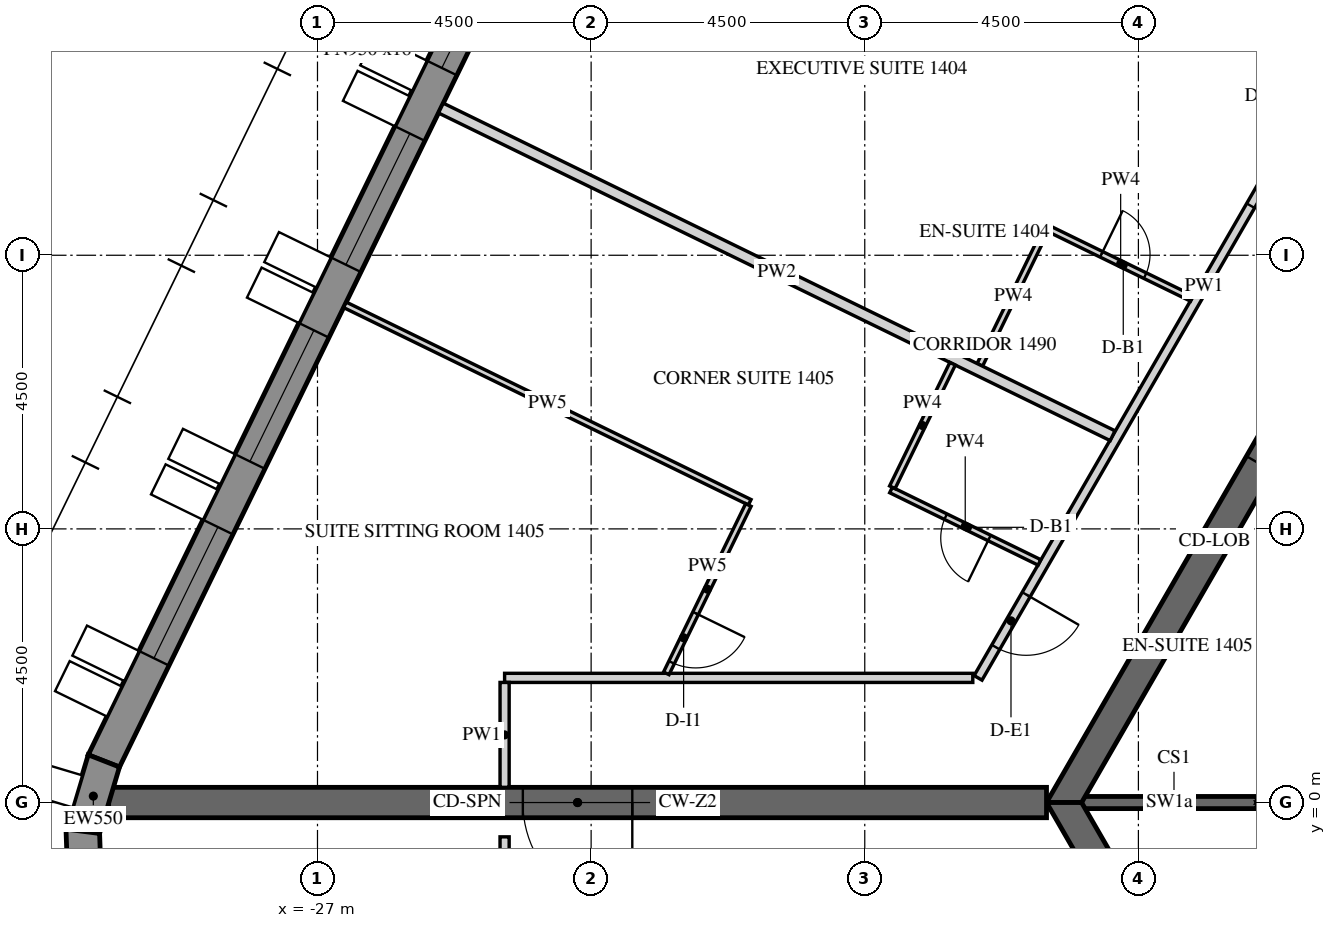
"""IFC4 building model, lengths in metres.
Left out: names, types, materials, properties, quantities, classifications, styles, units other than length and angle.
Written with IfcOpenShell. Run it as: python <this file> out.ifc"""

import sys

from ifc_helpers import new_model, si_unit, direction, frame, frame_2d, origin, place, context, subcontext, project, spatial, polyline, rectangle, outline, extrude, element, fill, save


model = new_model("IFC4")
c1 = context("Model", 3, precision=1e-05, world=origin(), true_north=direction((0.0, 1.0)))
c2 = subcontext(c1, "Body", "Model", "MODEL_VIEW")
j1 = project(units=[si_unit("LENGTHUNIT", "METRE"), si_unit("PLANEANGLEUNIT", "RADIAN")], contexts=[c1])
p1 = place(None, origin())
s1 = spatial("IfcSite", under=j1, at=p1, CompositionType="ELEMENT")
p2 = place(p1, origin())
s2 = spatial("IfcBuilding", under=s1, at=p2, CompositionType="ELEMENT")
p3 = place(p2, frame((0.0, 0.0, 183.9)))
s3 = spatial("IfcBuildingStorey", under=s2, at=p3, CompositionType="ELEMENT", Elevation=183.9)
p4 = place(p3, frame((-18.345, 25.633, -0.15), z_axis=(0.0, 0.0, 1.0), x_axis=(-0.43837181828, -0.898793718791, 0.0)))
e1 = element("IfcWall", 1, at=p4, inside=s3, PredefinedType="SOLIDWALL", context=c2, shape_type="SweptSolid", body=[
    extrude(outline(polyline([(-0.026, -0.275), (27.78, -0.275), (27.735, 0.275), (0.026, 0.275), (-0.026, -0.275)])), origin(), (0.0, 0.0, 1.0), 3.9),
])
p5 = place(p4, frame((1.879, 0.0, 1.05)))
e2 = element("IfcOpeningElement", 2, at=p5, cuts=e1, PredefinedType="OPENING", context=c2, shape_type="SweptSolid", body=[
    extrude(rectangle(XDim=2.4, YDim=2.4, at=frame_2d((1.2, 1.2))), frame((0.0, 0.285, 0.0), z_axis=(0.0, -1.0, 0.0), x_axis=(1.0, 0.0, 0.0)), (0.0, 0.0, 1.0), 0.57),
])
p6 = place(p4, frame((5.479, 0.0, 1.05)))
e3 = element("IfcOpeningElement", 3, at=p6, cuts=e1, PredefinedType="OPENING", context=c2, shape_type="SweptSolid", body=[
    extrude(rectangle(XDim=2.4, YDim=2.4, at=frame_2d((1.2, 1.2))), frame((0.0, 0.285, 0.0), z_axis=(0.0, -1.0, 0.0), x_axis=(1.0, 0.0, 0.0)), (0.0, 0.0, 1.0), 0.57),
])
p7 = place(p4, frame((9.079, 0.0, 1.05)))
e4 = element("IfcOpeningElement", 4, at=p7, cuts=e1, PredefinedType="OPENING", context=c2, shape_type="SweptSolid", body=[
    extrude(rectangle(XDim=2.4, YDim=2.4, at=frame_2d((1.2, 1.2))), frame((0.0, 0.285, 0.0), z_axis=(0.0, -1.0, 0.0), x_axis=(1.0, 0.0, 0.0)), (0.0, 0.0, 1.0), 0.57),
])
p8 = place(p4, frame((12.679, 0.0, 1.05)))
e5 = element("IfcOpeningElement", 5, at=p8, cuts=e1, PredefinedType="OPENING", context=c2, shape_type="SweptSolid", body=[
    extrude(rectangle(XDim=2.4, YDim=2.4, at=frame_2d((1.2, 1.2))), frame((0.0, 0.285, 0.0), z_axis=(0.0, -1.0, 0.0), x_axis=(1.0, 0.0, 0.0)), (0.0, 0.0, 1.0), 0.57),
])
p9 = place(p4, frame((16.279, 0.0, 1.05)))
e6 = element("IfcOpeningElement", 6, at=p9, cuts=e1, PredefinedType="OPENING", context=c2, shape_type="SweptSolid", body=[
    extrude(rectangle(XDim=2.4, YDim=2.4, at=frame_2d((1.2, 1.2))), frame((0.0, 0.285, 0.0), z_axis=(0.0, -1.0, 0.0), x_axis=(1.0, 0.0, 0.0)), (0.0, 0.0, 1.0), 0.57),
])
p10 = place(p4, frame((19.879, 0.0, 1.05)))
e7 = element("IfcOpeningElement", 7, at=p10, cuts=e1, PredefinedType="OPENING", context=c2, shape_type="SweptSolid", body=[
    extrude(rectangle(XDim=2.4, YDim=2.4, at=frame_2d((1.2, 1.2))), frame((0.0, 0.285, 0.0), z_axis=(0.0, -1.0, 0.0), x_axis=(1.0, 0.0, 0.0)), (0.0, 0.0, 1.0), 0.57),
])
p11 = place(p4, frame((23.479, 0.0, 1.05)))
e8 = element("IfcOpeningElement", 8, at=p11, cuts=e1, PredefinedType="OPENING", context=c2, shape_type="SweptSolid", body=[
    extrude(rectangle(XDim=2.4, YDim=2.4, at=frame_2d((1.2, 1.2))), frame((0.0, 0.285, 0.0), z_axis=(0.0, -1.0, 0.0), x_axis=(1.0, 0.0, 0.0)), (0.0, 0.0, 1.0), 0.57),
])
p12 = place(p3, frame((-30.513, 0.684, -0.15), z_axis=(0.0, 0.0, 1.0), x_axis=(-0.286736058109, -0.958009620505, 0.0)))
e9 = element("IfcWall", 9, at=p12, inside=s3, PredefinedType="SOLIDWALL", context=c2, shape_type="SweptSolid", body=[
    extrude(outline(polyline([(-0.022, -0.275), (1.253, -0.275), (1.163, 0.275), (0.022, 0.275), (-0.022, -0.275)])), origin(), (0.0, 0.0, 1.0), 3.9),
])
p13 = place(p3, frame((-30.86, -0.473, -0.15), z_axis=(0.0, 0.0, 1.0), x_axis=(0.03495638276, -0.999388838893, 0.0)))
e10 = element("IfcWall", 10, at=p13, inside=s3, PredefinedType="SOLIDWALL", context=c2, shape_type="SweptSolid", body=[
    extrude(outline(polyline([(-0.045, -0.275), (1.253, -0.275), (1.163, 0.275), (0.045, 0.275), (-0.045, -0.275)])), origin(), (0.0, 0.0, 1.0), 3.9),
])
p14 = place(p3, frame((-7.361, 12.75, -0.15), z_axis=(0.0, 0.0, 1.0), x_axis=(-0.50000571537, -0.866022103989, 0.0)))
e11 = element("IfcWall", 11, at=p14, inside=s3, PredefinedType="SHEAR", context=c2, shape_type="SweptSolid", body=[
    extrude(outline(polyline([(-0.144, -0.25), (14.867, -0.25), (14.578, 0.25), (0.144, 0.25), (-0.144, -0.25)])), origin(), (0.0, 0.0, 1.0), 3.9),
])
p15 = place(p14, frame((6.49, 0.0, 0.15)))
e12 = element("IfcOpeningElement", 12, at=p15, cuts=e11, PredefinedType="OPENING", context=c2, shape_type="SweptSolid", body=[
    extrude(rectangle(XDim=1.8, YDim=2.4, at=frame_2d((0.9, 1.2))), frame((0.0, 0.26, 0.0), z_axis=(0.0, -1.0, 0.0), x_axis=(1.0, 0.0, 0.0)), (0.0, 0.0, 1.0), 0.52),
])
p16 = place(p3, frame((-14.722, 0.0, -0.15), z_axis=(0.0, 0.0, 1.0), x_axis=(0.50000571537, -0.866022103989, 0.0)))
e13 = element("IfcWall", 13, at=p16, inside=s3, PredefinedType="SHEAR", context=c2, shape_type="SweptSolid", body=[
    extrude(outline(polyline([(-0.144, -0.25), (14.867, -0.25), (14.578, 0.25), (0.144, 0.25), (-0.144, -0.25)])), origin(), (0.0, 0.0, 1.0), 3.9),
])
p17 = place(p16, frame((6.432, 0.0, 0.15)))
e14 = element("IfcOpeningElement", 14, at=p17, cuts=e13, PredefinedType="OPENING", context=c2, shape_type="SweptSolid", body=[
    extrude(rectangle(XDim=1.8, YDim=2.4, at=frame_2d((0.9, 1.2))), frame((0.0, 0.26, 0.0), z_axis=(0.0, -1.0, 0.0), x_axis=(1.0, 0.0, 0.0)), (0.0, 0.0, 1.0), 0.52),
])
p18 = place(p3, frame((-15.011, 0.0, -0.15), z_axis=(0.0, 0.0, 1.0), x_axis=(-1.0, 0.0, 0.0)))
e15 = element("IfcWall", 15, at=p18, inside=s3, PredefinedType="SHEAR", context=c2, shape_type="SweptSolid", body=[
    extrude(rectangle(XDim=15.424, YDim=0.5, at=frame_2d((7.712, 0.0))), origin(), (0.0, 0.0, 1.0), 3.9),
])
p19 = place(p18, frame((6.812, 0.0, 0.15)))
e16 = element("IfcOpeningElement", 16, at=p19, cuts=e15, PredefinedType="OPENING", context=c2, shape_type="SweptSolid", body=[
    extrude(rectangle(XDim=1.8, YDim=2.4, at=frame_2d((0.9, 1.2))), frame((0.0, 0.26, 0.0), z_axis=(0.0, -1.0, 0.0), x_axis=(1.0, 0.0, 0.0)), (0.0, 0.0, 1.0), 0.52),
])
p20 = place(p3, frame((-11.547, 0.0, -0.15), z_axis=(0.0, 0.0, 1.0), x_axis=(-1.0, 0.0, 0.0)))
e17 = element("IfcWall", 17, at=p20, inside=s3, PredefinedType="SHEAR", context=c2, shape_type="SweptSolid", body=[
    extrude(rectangle(XDim=2.887, YDim=0.2, at=frame_2d((1.443, 0.0))), origin(), (0.0, 0.0, 1.0), 3.9),
])
p21 = place(p3, frame((-8.704, 14.925, 0.0), z_axis=(0.0, 0.0, 1.0), x_axis=(-0.499998228944, -0.866026426302, 0.0)))
e18 = element("IfcWall", 18, at=p21, inside=s3, PredefinedType="PARTITIONING", context=c2, shape_type="SweptSolid", body=[
    extrude(rectangle(XDim=14.867, YDim=0.15, at=frame_2d((7.433, 0.0))), origin(), (0.0, 0.0, 1.0), 2.988),
])
p22 = place(p21, frame((4.901, 0.0, 0.0)))
e19 = element("IfcOpeningElement", 19, at=p22, cuts=e18, PredefinedType="OPENING", context=c2, shape_type="SweptSolid", body=[
    extrude(rectangle(XDim=1.0, YDim=2.1, at=frame_2d((0.5, 1.05))), frame((0.0, 0.085, 0.0), z_axis=(0.0, -1.0, 0.0), x_axis=(1.0, 0.0, 0.0)), (0.0, 0.0, 1.0), 0.17),
])
p23 = place(p21, frame((13.284, 0.0, 0.0)))
e20 = element("IfcOpeningElement", 20, at=p23, cuts=e18, PredefinedType="OPENING", context=c2, shape_type="SweptSolid", body=[
    extrude(rectangle(XDim=1.0, YDim=2.1, at=frame_2d((0.5, 1.05))), frame((0.0, 0.085, 0.0), z_axis=(0.0, -1.0, 0.0), x_axis=(1.0, 0.0, 0.0)), (0.0, 0.0, 1.0), 0.17),
])
p24 = place(p3, frame((-16.224, 2.05, 0.0), z_axis=(0.0, 0.0, 1.0), x_axis=(-1.0, 0.0, 0.0)))
e21 = element("IfcWall", 21, at=p24, inside=s3, PredefinedType="PARTITIONING", context=c2, shape_type="SweptSolid", body=[
    extrude(rectangle(XDim=7.699, YDim=0.15, at=frame_2d((3.85, 0.0))), origin(), (0.0, 0.0, 1.0), 2.988),
])
p25 = place(p3, frame((-23.923, 1.975, 0.0), z_axis=(0.0, 0.0, 1.0), x_axis=(0.0, -1.0, 0.0)))
e22 = element("IfcWall", 22, at=p25, inside=s3, PredefinedType="PARTITIONING", context=c2, shape_type="SweptSolid", body=[
    extrude(rectangle(XDim=1.725, YDim=0.15, at=frame_2d((0.863, 0.0))), origin(), (0.0, 0.0, 1.0), 2.988),
])
p26 = place(p3, frame((-23.923, -0.564, 0.0), z_axis=(0.0, 0.0, 1.0), x_axis=(0.0, -1.0, 0.0)))
e23 = element("IfcWall", 23, at=p26, inside=s3, PredefinedType="PARTITIONING", context=c2, shape_type="SweptSolid", body=[
    extrude(rectangle(XDim=1.486, YDim=0.15, at=frame_2d((0.743, 0.0))), origin(), (0.0, 0.0, 1.0), 2.988),
])
p27 = place(p3, frame((-21.815, 17.892, 0.0), z_axis=(0.0, 0.0, 1.0), x_axis=(0.898799253997, -0.438360469265, 0.0)))
e24 = element("IfcWall", 24, at=p27, inside=s3, PredefinedType="PARTITIONING", context=c2, shape_type="SweptSolid", body=[
    extrude(rectangle(XDim=12.794, YDim=0.18, at=frame_2d((6.397, 0.0))), origin(), (0.0, 0.0, 1.0), 2.988),
])
p28 = place(p3, frame((-16.108, 7.198, 0.0), z_axis=(0.0, 0.0, 1.0), x_axis=(0.438398718232, 0.898780598284, 0.0)))
e25 = element("IfcWall", 25, at=p28, inside=s3, PredefinedType="PARTITIONING", context=c2, shape_type="SweptSolid", body=[
    extrude(rectangle(XDim=2.51, YDim=0.1, at=frame_2d((1.255, 0.0))), origin(), (0.0, 0.0, 1.0), 2.988),
])
p29 = place(p3, frame((-14.962, 9.432, 0.0), z_axis=(0.0, 0.0, 1.0), x_axis=(0.898770247069, -0.438419939081, 0.0)))
e26 = element("IfcWall", 26, at=p29, inside=s3, PredefinedType="PARTITIONING", context=c2, shape_type="SweptSolid", body=[
    extrude(rectangle(XDim=2.605, YDim=0.1, at=frame_2d((1.302, 0.0))), origin(), (0.0, 0.0, 1.0), 2.988),
])
p30 = place(p29, frame((0.95, 0.0, 0.0)))
e27 = element("IfcOpeningElement", 27, at=p30, cuts=e26, PredefinedType="OPENING", context=c2, shape_type="SweptSolid", body=[
    extrude(rectangle(XDim=0.8, YDim=2.1, at=frame_2d((0.4, 1.05))), frame((0.0, 0.06, 0.0), z_axis=(0.0, -1.0, 0.0), x_axis=(1.0, 0.0, 0.0)), (0.0, 0.0, 1.0), 0.12),
])
p31 = place(p3, frame((-24.971, 11.42, 0.0), z_axis=(0.0, 0.0, 1.0), x_axis=(0.898797462081, -0.438364143329, 0.0)))
e28 = element("IfcWall", 28, at=p31, inside=s3, PredefinedType="PARTITIONING", context=c2, shape_type="SweptSolid", body=[
    extrude(rectangle(XDim=12.291, YDim=0.18, at=frame_2d((6.145, 0.0))), origin(), (0.0, 0.0, 1.0), 2.988),
])
p32 = place(p3, frame((-15.127, 3.949, 0.0), z_axis=(0.0, 0.0, 1.0), x_axis=(-0.898788314205, 0.438382899128, 0.0)))
e29 = element("IfcWall", 29, at=p32, inside=s3, PredefinedType="PARTITIONING", context=c2, shape_type="SweptSolid", body=[
    extrude(rectangle(XDim=2.716, YDim=0.1, at=frame_2d((1.358, 0.0))), origin(), (0.0, 0.0, 1.0), 2.988),
])
p33 = place(p32, frame((0.916, 0.0, 0.0)))
e30 = element("IfcOpeningElement", 30, at=p33, cuts=e29, PredefinedType="OPENING", context=c2, shape_type="SweptSolid", body=[
    extrude(rectangle(XDim=0.8, YDim=2.1, at=frame_2d((0.4, 1.05))), frame((0.0, 0.06, 0.0), z_axis=(0.0, -1.0, 0.0), x_axis=(1.0, 0.0, 0.0)), (0.0, 0.0, 1.0), 0.12),
])
p34 = place(p3, frame((-17.546, 5.185, 0.0), z_axis=(0.0, 0.0, 1.0), x_axis=(0.438376807268, 0.898791285477, 0.0)))
e31 = element("IfcWall", 31, at=p34, inside=s3, PredefinedType="PARTITIONING", context=c2, shape_type="SweptSolid", body=[
    extrude(rectangle(XDim=2.26, YDim=0.1, at=frame_2d((1.13, 0.0))), origin(), (0.0, 0.0, 1.0), 2.988),
])
p35 = place(p3, frame((-26.549, 8.185, 0.0), z_axis=(0.0, 0.0, 1.0), x_axis=(0.898794104644, -0.438371027163, 0.0)))
e32 = element("IfcWall", 32, at=p35, inside=s3, PredefinedType="PARTITIONING", context=c2, shape_type="SweptSolid", body=[
    extrude(rectangle(XDim=7.406, YDim=0.1, at=frame_2d((3.703, 0.0))), origin(), (0.0, 0.0, 1.0), 2.988),
])
p36 = place(p3, frame((-19.914, 4.893, 0.0), z_axis=(0.0, 0.0, 1.0), x_axis=(-0.438408012527, -0.898776064741, 0.0)))
e33 = element("IfcWall", 33, at=p36, inside=s3, PredefinedType="PARTITIONING", context=c2, shape_type="SweptSolid", body=[
    extrude(rectangle(XDim=3.08, YDim=0.1, at=frame_2d((1.54, 0.0))), origin(), (0.0, 0.0, 1.0), 2.988),
])
p37 = place(p36, frame((1.979, 0.0, 0.0)))
e34 = element("IfcOpeningElement", 34, at=p37, cuts=e33, PredefinedType="OPENING", context=c2, shape_type="SweptSolid", body=[
    extrude(rectangle(XDim=0.9, YDim=2.1, at=frame_2d((0.45, 1.05))), frame((0.0, 0.06, 0.0), z_axis=(0.0, -1.0, 0.0), x_axis=(1.0, 0.0, 0.0)), (0.0, 0.0, 1.0), 0.12),
])
p38 = place(p8, frame((0.0, 0.205, 0.0)))
e35 = element("IfcWindow", 35, at=p38, inside=s3, PartitioningType="DOUBLE_PANEL_VERTICAL", PredefinedType="WINDOW", context=c2, shape_type="SweptSolid", body=[
    extrude(rectangle(XDim=2.4, YDim=2.4, at=frame_2d((1.2, 1.2))), frame((0.0, 0.03, 0.0), z_axis=(0.0, -1.0, 0.0), x_axis=(1.0, 0.0, 0.0)), (0.0, 0.0, 1.0), 0.06),
])
fill(e5, e35)
p39 = place(p9, frame((0.0, 0.205, 0.0)))
e36 = element("IfcWindow", 36, at=p39, inside=s3, PartitioningType="DOUBLE_PANEL_VERTICAL", PredefinedType="WINDOW", context=c2, shape_type="SweptSolid", body=[
    extrude(rectangle(XDim=2.4, YDim=2.4, at=frame_2d((1.2, 1.2))), frame((0.0, 0.03, 0.0), z_axis=(0.0, -1.0, 0.0), x_axis=(1.0, 0.0, 0.0)), (0.0, 0.0, 1.0), 0.06),
])
fill(e6, e36)
p40 = place(p10, frame((0.0, 0.205, 0.0)))
e37 = element("IfcWindow", 37, at=p40, inside=s3, PartitioningType="DOUBLE_PANEL_VERTICAL", PredefinedType="WINDOW", context=c2, shape_type="SweptSolid", body=[
    extrude(rectangle(XDim=2.4, YDim=2.4, at=frame_2d((1.2, 1.2))), frame((0.0, 0.03, 0.0), z_axis=(0.0, -1.0, 0.0), x_axis=(1.0, 0.0, 0.0)), (0.0, 0.0, 1.0), 0.06),
])
fill(e7, e37)
p41 = place(p11, frame((0.0, 0.205, 0.0)))
e38 = element("IfcWindow", 38, at=p41, inside=s3, PartitioningType="DOUBLE_PANEL_VERTICAL", PredefinedType="WINDOW", context=c2, shape_type="SweptSolid", body=[
    extrude(rectangle(XDim=2.4, YDim=2.4, at=frame_2d((1.2, 1.2))), frame((0.0, 0.03, 0.0), z_axis=(0.0, -1.0, 0.0), x_axis=(1.0, 0.0, 0.0)), (0.0, 0.0, 1.0), 0.06),
])
fill(e8, e38)
p42 = place(p19, origin())
e39 = element("IfcDoor", 39, at=p42, inside=s3, OperationType="DOUBLE_DOOR_SINGLE_SWING", PredefinedType="DOOR", context=c2, shape_type="SweptSolid", body=[
    extrude(rectangle(XDim=1.8, YDim=2.4, at=frame_2d((0.9, 1.2))), frame((0.0, 0.025, 0.0), z_axis=(0.0, -1.0, 0.0), x_axis=(1.0, 0.0, 0.0)), (0.0, 0.0, 1.0), 0.05),
])
fill(e16, e39)
p43 = place(p22, origin())
e40 = element("IfcDoor", 40, at=p43, inside=s3, OperationType="SINGLE_SWING_RIGHT", PredefinedType="DOOR", context=c2, shape_type="SweptSolid", body=[
    extrude(rectangle(XDim=1.0, YDim=2.1, at=frame_2d((0.5, 1.05))), frame((0.0, 0.025, 0.0), z_axis=(0.0, -1.0, 0.0), x_axis=(1.0, 0.0, 0.0)), (0.0, 0.0, 1.0), 0.05),
])
fill(e19, e40)
p44 = place(p30, origin())
e41 = element("IfcDoor", 41, at=p44, inside=s3, OperationType="SINGLE_SWING_LEFT", PredefinedType="DOOR", context=c2, shape_type="SweptSolid", body=[
    extrude(rectangle(XDim=0.8, YDim=2.1, at=frame_2d((0.4, 1.05))), frame((0.0, 0.025, 0.0), z_axis=(0.0, -1.0, 0.0), x_axis=(1.0, 0.0, 0.0)), (0.0, 0.0, 1.0), 0.05),
])
fill(e27, e41)
p45 = place(p23, origin())
e42 = element("IfcDoor", 42, at=p45, inside=s3, OperationType="SINGLE_SWING_LEFT", PredefinedType="DOOR", context=c2, shape_type="SweptSolid", body=[
    extrude(rectangle(XDim=1.0, YDim=2.1, at=frame_2d((0.5, 1.05))), frame((0.0, 0.025, 0.0), z_axis=(0.0, -1.0, 0.0), x_axis=(1.0, 0.0, 0.0)), (0.0, 0.0, 1.0), 0.05),
])
fill(e20, e42)
p46 = place(p33, origin())
e43 = element("IfcDoor", 43, at=p46, inside=s3, OperationType="SINGLE_SWING_RIGHT", PredefinedType="DOOR", context=c2, shape_type="SweptSolid", body=[
    extrude(rectangle(XDim=0.8, YDim=2.1, at=frame_2d((0.4, 1.05))), frame((0.0, 0.025, 0.0), z_axis=(0.0, -1.0, 0.0), x_axis=(1.0, 0.0, 0.0)), (0.0, 0.0, 1.0), 0.05),
])
fill(e30, e43)
p47 = place(p37, origin())
e44 = element("IfcDoor", 44, at=p47, inside=s3, OperationType="SINGLE_SWING_LEFT", PredefinedType="DOOR", context=c2, shape_type="SweptSolid", body=[
    extrude(rectangle(XDim=0.9, YDim=2.1, at=frame_2d((0.45, 1.05))), frame((0.0, 0.025, 0.0), z_axis=(0.0, -1.0, 0.0), x_axis=(1.0, 0.0, 0.0)), (0.0, 0.0, 1.0), 0.05),
])
fill(e34, e44)
save(model, sys.argv[1])
